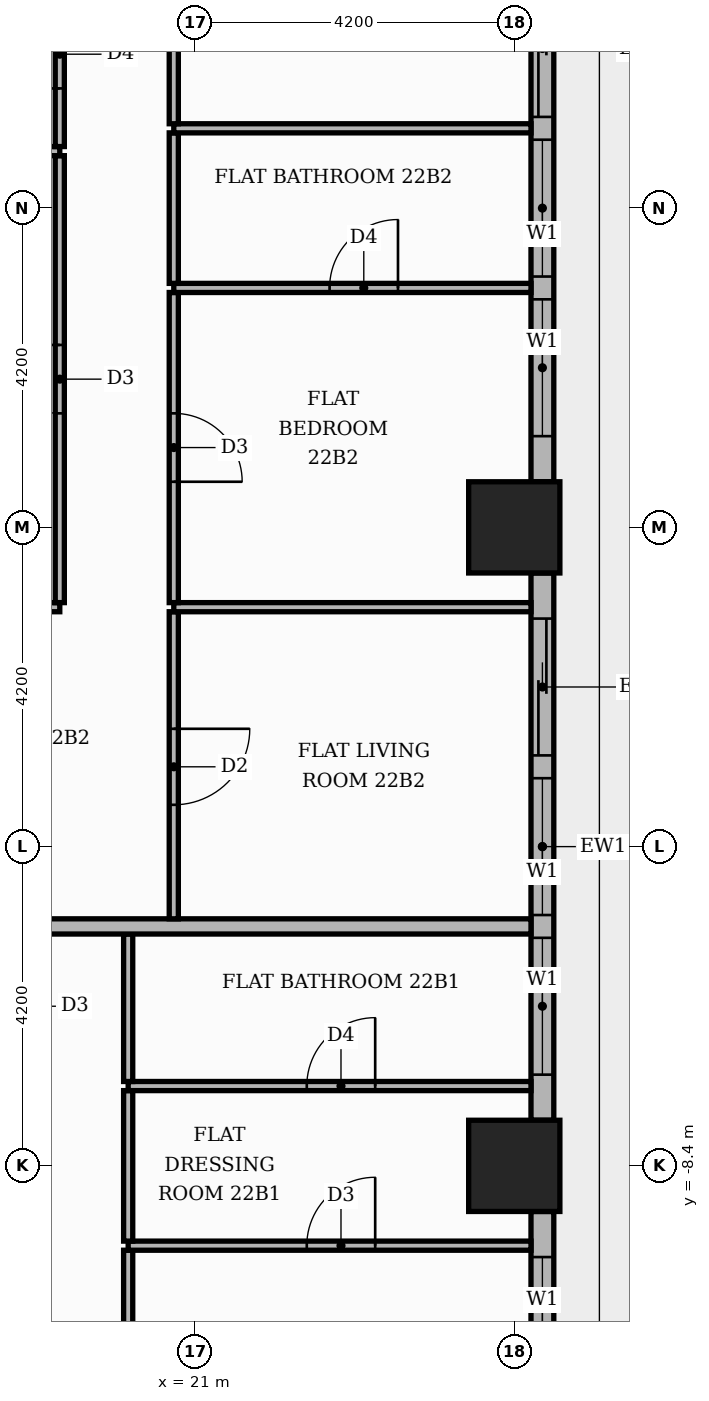
"""IFC4 building model, lengths in metres.
Left out: names, types, materials, properties, quantities, classifications, styles, units other than length and angle.
Written with IfcOpenShell. Run it as: python <this file> out.ifc"""

import sys

from ifc_helpers import new_model, si_unit, direction, frame, frame_2d, origin, origin_2d, place, context, subcontext, project, spatial, rectangle, extrude, element, fill, save


model = new_model("IFC4")
c1 = context("Model", 3, precision=1e-05, world=origin(), true_north=direction((0.0, 1.0)))
c2 = subcontext(c1, "Body", "Model", "MODEL_VIEW")
j1 = project(units=[si_unit("LENGTHUNIT", "METRE"), si_unit("PLANEANGLEUNIT", "RADIAN")], contexts=[c1])
p1 = place(None, origin())
s1 = spatial("IfcSite", under=j1, at=p1, CompositionType="ELEMENT")
p2 = place(p1, origin())
s2 = spatial("IfcBuilding", under=s1, at=p2, CompositionType="ELEMENT")
p3 = place(p2, frame((0.0, 0.0, 94.8)))
s3 = spatial("IfcBuildingStorey", under=s2, at=p3, CompositionType="ELEMENT", Elevation=94.8)
for number, where, z_axis, x_axis in (
    (1, (25.2, 0.0, 0.0), (0.0, 0.0, 1.0), (1.0, 0.0, 0.0)),
    (2, (25.2, -8.4, 0.0), (0.0, 0.0, 1.0), (1.0, 0.0, 0.0)),
):
    element("IfcColumn", number, at=place(p3, frame(where, z_axis=z_axis, x_axis=x_axis)), inside=s3, PredefinedType="COLUMN", context=c2, shape_type="SweptSolid", body=[
        extrude(rectangle(XDim=1.2, YDim=1.2, at=origin_2d()), origin(), (0.0, 0.0, 1.0), 3.9),
    ])
p4 = place(p3, frame((25.57, -16.2, 0.0), z_axis=(0.0, 0.0, 1.0), x_axis=(0.0, 1.0, 0.0)))
e3 = element("IfcWall", 3, at=p4, inside=s3, PredefinedType="STANDARD", context=c2, shape_type="SweptSolid", body=[
    extrude(rectangle(XDim=7.2, YDim=0.3, at=frame_2d((3.6, 0.0))), origin(), (0.0, 0.0, 1.0), 3.48),
])
p5 = place(p4, frame((0.6, 0.0, 0.0)))
e4 = element("IfcOpeningElement", 4, at=p5, cuts=e3, PredefinedType="OPENING", context=c2, shape_type="SweptSolid", body=[
    extrude(rectangle(XDim=1.8, YDim=2.4, at=frame_2d((0.9, 1.2))), frame((0.0, 0.16, 0.0), z_axis=(0.0, -1.0, 0.0), x_axis=(1.0, 0.0, 0.0)), (0.0, 0.0, 1.0), 0.32),
])
p6 = place(p4, frame((2.7, 0.0, 0.0)))
e5 = element("IfcOpeningElement", 5, at=p6, cuts=e3, PredefinedType="OPENING", context=c2, shape_type="SweptSolid", body=[
    extrude(rectangle(XDim=1.8, YDim=2.4, at=frame_2d((0.9, 1.2))), frame((0.0, 0.16, 0.0), z_axis=(0.0, -1.0, 0.0), x_axis=(1.0, 0.0, 0.0)), (0.0, 0.0, 1.0), 0.32),
])
p7 = place(p4, frame((4.8, 0.0, 0.9)))
e6 = element("IfcOpeningElement", 6, at=p7, cuts=e3, PredefinedType="OPENING", context=c2, shape_type="SweptSolid", body=[
    extrude(rectangle(XDim=1.8, YDim=2.1, at=frame_2d((0.9, 1.05))), frame((0.0, 0.16, 0.0), z_axis=(0.0, -1.0, 0.0), x_axis=(1.0, 0.0, 0.0)), (0.0, 0.0, 1.0), 0.32),
])
p8 = place(p3, frame((25.57, -7.8, 0.0), z_axis=(0.0, 0.0, 1.0), x_axis=(0.0, 1.0, 0.0)))
e7 = element("IfcWall", 7, at=p8, inside=s3, PredefinedType="STANDARD", context=c2, shape_type="SweptSolid", body=[
    extrude(rectangle(XDim=7.2, YDim=0.3, at=frame_2d((3.6, 0.0))), origin(), (0.0, 0.0, 1.0), 3.48),
])
p9 = place(p8, frame((0.6, 0.0, 0.9)))
e8 = element("IfcOpeningElement", 8, at=p9, cuts=e7, PredefinedType="OPENING", context=c2, shape_type="SweptSolid", body=[
    extrude(rectangle(XDim=1.8, YDim=2.1, at=frame_2d((0.9, 1.05))), frame((0.0, 0.16, 0.0), z_axis=(0.0, -1.0, 0.0), x_axis=(1.0, 0.0, 0.0)), (0.0, 0.0, 1.0), 0.32),
])
p10 = place(p8, frame((2.7, 0.0, 0.9)))
e9 = element("IfcOpeningElement", 9, at=p10, cuts=e7, PredefinedType="OPENING", context=c2, shape_type="SweptSolid", body=[
    extrude(rectangle(XDim=1.8, YDim=2.1, at=frame_2d((0.9, 1.05))), frame((0.0, 0.16, 0.0), z_axis=(0.0, -1.0, 0.0), x_axis=(1.0, 0.0, 0.0)), (0.0, 0.0, 1.0), 0.32),
])
p11 = place(p8, frame((4.8, 0.0, 0.0)))
e10 = element("IfcOpeningElement", 10, at=p11, cuts=e7, PredefinedType="OPENING", context=c2, shape_type="SweptSolid", body=[
    extrude(rectangle(XDim=1.8, YDim=2.4, at=frame_2d((0.9, 1.2))), frame((0.0, 0.16, 0.0), z_axis=(0.0, -1.0, 0.0), x_axis=(1.0, 0.0, 0.0)), (0.0, 0.0, 1.0), 0.32),
])
p12 = place(p3, frame((25.57, 0.6, 0.0), z_axis=(0.0, 0.0, 1.0), x_axis=(0.0, 1.0, 0.0)))
e11 = element("IfcWall", 11, at=p12, inside=s3, PredefinedType="STANDARD", context=c2, shape_type="SweptSolid", body=[
    extrude(rectangle(XDim=7.2, YDim=0.3, at=frame_2d((3.6, 0.0))), origin(), (0.0, 0.0, 1.0), 3.48),
])
p13 = place(p12, frame((0.6, 0.0, 0.9)))
e12 = element("IfcOpeningElement", 12, at=p13, cuts=e11, PredefinedType="OPENING", context=c2, shape_type="SweptSolid", body=[
    extrude(rectangle(XDim=1.8, YDim=2.1, at=frame_2d((0.9, 1.05))), frame((0.0, 0.16, 0.0), z_axis=(0.0, -1.0, 0.0), x_axis=(1.0, 0.0, 0.0)), (0.0, 0.0, 1.0), 0.32),
])
p14 = place(p12, frame((2.7, 0.0, 0.9)))
e13 = element("IfcOpeningElement", 13, at=p14, cuts=e11, PredefinedType="OPENING", context=c2, shape_type="SweptSolid", body=[
    extrude(rectangle(XDim=1.8, YDim=2.1, at=frame_2d((0.9, 1.05))), frame((0.0, 0.16, 0.0), z_axis=(0.0, -1.0, 0.0), x_axis=(1.0, 0.0, 0.0)), (0.0, 0.0, 1.0), 0.32),
])
p15 = place(p12, frame((4.8, 0.0, 0.0)))
e14 = element("IfcOpeningElement", 14, at=p15, cuts=e11, PredefinedType="OPENING", context=c2, shape_type="SweptSolid", body=[
    extrude(rectangle(XDim=1.8, YDim=2.4, at=frame_2d((0.9, 1.2))), frame((0.0, 0.16, 0.0), z_axis=(0.0, -1.0, 0.0), x_axis=(1.0, 0.0, 0.0)), (0.0, 0.0, 1.0), 0.32),
])
p16 = place(p3, frame((20.12, -13.59, 0.0), z_axis=(0.0, 0.0, 1.0), x_axis=(0.0, 1.0, 0.0)))
e15 = element("IfcWall", 15, at=p16, inside=s3, PredefinedType="PARTITIONING", context=c2, shape_type="SweptSolid", body=[
    extrude(rectangle(XDim=4.08, YDim=0.12, at=frame_2d((2.04, 0.0))), origin(), (0.0, 0.0, 1.0), 3.48),
])
p17 = place(p16, frame((1.59, 0.0, 0.0)))
e16 = element("IfcOpeningElement", 16, at=p17, cuts=e15, PredefinedType="OPENING", context=c2, shape_type="SweptSolid", body=[
    extrude(rectangle(XDim=0.9, YDim=2.1, at=frame_2d((0.45, 1.05))), frame((0.0, 0.07, 0.0), z_axis=(0.0, -1.0, 0.0), x_axis=(1.0, 0.0, 0.0)), (0.0, 0.0, 1.0), 0.14),
])
p18 = place(p3, frame((20.12, -9.45, 0.0), z_axis=(0.0, 0.0, 1.0), x_axis=(1.0, 0.0, 0.0)))
e17 = element("IfcWall", 17, at=p18, inside=s3, PredefinedType="PARTITIONING", context=c2, shape_type="SweptSolid", body=[
    extrude(rectangle(XDim=5.3, YDim=0.12, at=frame_2d((2.65, 0.0))), origin(), (0.0, 0.0, 1.0), 3.48),
])
p19 = place(p18, frame((2.35, 0.0, 0.0)))
e18 = element("IfcOpeningElement", 18, at=p19, cuts=e17, PredefinedType="OPENING", context=c2, shape_type="SweptSolid", body=[
    extrude(rectangle(XDim=0.9, YDim=2.1, at=frame_2d((0.45, 1.05))), frame((0.0, 0.07, 0.0), z_axis=(0.0, -1.0, 0.0), x_axis=(1.0, 0.0, 0.0)), (0.0, 0.0, 1.0), 0.14),
])
p20 = place(p3, frame((20.12, -9.39, 0.0), z_axis=(0.0, 0.0, 1.0), x_axis=(0.0, 1.0, 0.0)))
e19 = element("IfcWall", 19, at=p20, inside=s3, PredefinedType="PARTITIONING", context=c2, shape_type="SweptSolid", body=[
    extrude(rectangle(XDim=1.98, YDim=0.12, at=frame_2d((0.99, 0.0))), origin(), (0.0, 0.0, 1.0), 3.48),
])
p21 = place(p3, frame((20.12, -7.35, 0.0), z_axis=(0.0, 0.0, 1.0), x_axis=(1.0, 0.0, 0.0)))
e20 = element("IfcWall", 20, at=p21, inside=s3, PredefinedType="PARTITIONING", context=c2, shape_type="SweptSolid", body=[
    extrude(rectangle(XDim=5.3, YDim=0.12, at=frame_2d((2.65, 0.0))), origin(), (0.0, 0.0, 1.0), 3.48),
])
p22 = place(p21, frame((2.35, 0.0, 0.0)))
e21 = element("IfcOpeningElement", 21, at=p22, cuts=e20, PredefinedType="OPENING", context=c2, shape_type="SweptSolid", body=[
    extrude(rectangle(XDim=0.9, YDim=2.1, at=frame_2d((0.45, 1.05))), frame((0.0, 0.07, 0.0), z_axis=(0.0, -1.0, 0.0), x_axis=(1.0, 0.0, 0.0)), (0.0, 0.0, 1.0), 0.14),
])
p23 = place(p3, frame((20.12, -7.29, 0.0), z_axis=(0.0, 0.0, 1.0), x_axis=(0.0, 1.0, 0.0)))
e22 = element("IfcWall", 22, at=p23, inside=s3, PredefinedType="PARTITIONING", context=c2, shape_type="SweptSolid", body=[
    extrude(rectangle(XDim=1.94, YDim=0.12, at=frame_2d((0.97, 0.0))), origin(), (0.0, 0.0, 1.0), 3.48),
])
p24 = place(p3, frame((13.65, -5.25, 0.0), z_axis=(0.0, 0.0, 1.0), x_axis=(1.0, 0.0, 0.0)))
e23 = element("IfcWall", 23, at=p24, inside=s3, PredefinedType="PARTITIONING", context=c2, shape_type="SweptSolid", body=[
    extrude(rectangle(XDim=11.77, YDim=0.2, at=frame_2d((5.885, 0.0))), origin(), (0.0, 0.0, 1.0), 3.48),
])
p25 = place(p3, frame((20.72, -5.15, 0.0), z_axis=(0.0, 0.0, 1.0), x_axis=(0.0, 1.0, 0.0)))
e24 = element("IfcWall", 24, at=p25, inside=s3, PredefinedType="PARTITIONING", context=c2, shape_type="SweptSolid", body=[
    extrude(rectangle(XDim=4.04, YDim=0.12, at=frame_2d((2.02, 0.0))), origin(), (0.0, 0.0, 1.0), 3.48),
])
p26 = place(p25, frame((1.5, 0.0, 0.0)))
e25 = element("IfcOpeningElement", 25, at=p26, cuts=e24, PredefinedType="OPENING", context=c2, shape_type="SweptSolid", body=[
    extrude(rectangle(XDim=1.0, YDim=2.1, at=frame_2d((0.5, 1.05))), frame((0.0, 0.07, 0.0), z_axis=(0.0, -1.0, 0.0), x_axis=(1.0, 0.0, 0.0)), (0.0, 0.0, 1.0), 0.14),
])
p27 = place(p3, frame((13.75, -1.05, 0.0), z_axis=(0.0, 0.0, 1.0), x_axis=(1.0, 0.0, 0.0)))
e26 = element("IfcWall", 26, at=p27, inside=s3, PredefinedType="PARTITIONING", context=c2, shape_type="SweptSolid", body=[
    extrude(rectangle(XDim=5.47, YDim=0.12, at=frame_2d((2.735, 0.0))), origin(), (0.0, 0.0, 1.0), 3.48),
])
p28 = place(p3, frame((20.72, -1.05, 0.0), z_axis=(0.0, 0.0, 1.0), x_axis=(1.0, 0.0, 0.0)))
e27 = element("IfcWall", 27, at=p28, inside=s3, PredefinedType="PARTITIONING", context=c2, shape_type="SweptSolid", body=[
    extrude(rectangle(XDim=4.7, YDim=0.12, at=frame_2d((2.35, 0.0))), origin(), (0.0, 0.0, 1.0), 3.48),
])
p29 = place(p3, frame((19.22, -0.99, 0.0), z_axis=(0.0, 0.0, 1.0), x_axis=(0.0, 1.0, 0.0)))
e28 = element("IfcWall", 28, at=p29, inside=s3, PredefinedType="PARTITIONING", context=c2, shape_type="SweptSolid", body=[
    extrude(rectangle(XDim=5.88, YDim=0.12, at=frame_2d((2.94, 0.0))), origin(), (0.0, 0.0, 1.0), 3.48),
])
p30 = place(p29, frame((2.49, 0.0, 0.0)))
e29 = element("IfcOpeningElement", 29, at=p30, cuts=e28, PredefinedType="OPENING", context=c2, shape_type="SweptSolid", body=[
    extrude(rectangle(XDim=0.9, YDim=2.1, at=frame_2d((0.45, 1.05))), frame((0.0, 0.07, 0.0), z_axis=(0.0, -1.0, 0.0), x_axis=(1.0, 0.0, 0.0)), (0.0, 0.0, 1.0), 0.14),
])
p31 = place(p3, frame((20.72, -0.99, 0.0), z_axis=(0.0, 0.0, 1.0), x_axis=(0.0, 1.0, 0.0)))
e30 = element("IfcWall", 30, at=p31, inside=s3, PredefinedType="PARTITIONING", context=c2, shape_type="SweptSolid", body=[
    extrude(rectangle(XDim=4.08, YDim=0.12, at=frame_2d((2.04, 0.0))), origin(), (0.0, 0.0, 1.0), 3.48),
])
p32 = place(p31, frame((1.59, 0.0, 0.0)))
e31 = element("IfcOpeningElement", 31, at=p32, cuts=e30, PredefinedType="OPENING", context=c2, shape_type="SweptSolid", body=[
    extrude(rectangle(XDim=0.9, YDim=2.1, at=frame_2d((0.45, 1.05))), frame((0.0, 0.07, 0.0), z_axis=(0.0, -1.0, 0.0), x_axis=(1.0, 0.0, 0.0)), (0.0, 0.0, 1.0), 0.14),
])
p33 = place(p3, frame((20.72, 3.15, 0.0), z_axis=(0.0, 0.0, 1.0), x_axis=(1.0, 0.0, 0.0)))
e32 = element("IfcWall", 32, at=p33, inside=s3, PredefinedType="PARTITIONING", context=c2, shape_type="SweptSolid", body=[
    extrude(rectangle(XDim=4.7, YDim=0.12, at=frame_2d((2.35, 0.0))), origin(), (0.0, 0.0, 1.0), 3.48),
])
p34 = place(p33, frame((2.05, 0.0, 0.0)))
e33 = element("IfcOpeningElement", 33, at=p34, cuts=e32, PredefinedType="OPENING", context=c2, shape_type="SweptSolid", body=[
    extrude(rectangle(XDim=0.9, YDim=2.1, at=frame_2d((0.45, 1.05))), frame((0.0, 0.07, 0.0), z_axis=(0.0, -1.0, 0.0), x_axis=(1.0, 0.0, 0.0)), (0.0, 0.0, 1.0), 0.14),
])
p35 = place(p3, frame((20.72, 3.21, 0.0), z_axis=(0.0, 0.0, 1.0), x_axis=(0.0, 1.0, 0.0)))
e34 = element("IfcWall", 34, at=p35, inside=s3, PredefinedType="PARTITIONING", context=c2, shape_type="SweptSolid", body=[
    extrude(rectangle(XDim=1.98, YDim=0.12, at=frame_2d((0.99, 0.0))), origin(), (0.0, 0.0, 1.0), 3.48),
])
p36 = place(p3, frame((13.75, 4.95, 0.0), z_axis=(0.0, 0.0, 1.0), x_axis=(1.0, 0.0, 0.0)))
e35 = element("IfcWall", 35, at=p36, inside=s3, PredefinedType="PARTITIONING", context=c2, shape_type="SweptSolid", body=[
    extrude(rectangle(XDim=5.47, YDim=0.12, at=frame_2d((2.735, 0.0))), origin(), (0.0, 0.0, 1.0), 3.48),
])
p37 = place(p3, frame((19.22, 5.01, 0.0), z_axis=(0.0, 0.0, 1.0), x_axis=(0.0, 1.0, 0.0)))
e36 = element("IfcWall", 36, at=p37, inside=s3, PredefinedType="PARTITIONING", context=c2, shape_type="SweptSolid", body=[
    extrude(rectangle(XDim=2.43, YDim=0.12, at=frame_2d((1.215, 0.0))), origin(), (0.0, 0.0, 1.0), 3.48),
])
p38 = place(p37, frame((0.765, 0.0, 0.0)))
e37 = element("IfcOpeningElement", 37, at=p38, cuts=e36, PredefinedType="OPENING", context=c2, shape_type="SweptSolid", body=[
    extrude(rectangle(XDim=0.9, YDim=2.1, at=frame_2d((0.45, 1.05))), frame((0.0, 0.07, 0.0), z_axis=(0.0, -1.0, 0.0), x_axis=(1.0, 0.0, 0.0)), (0.0, 0.0, 1.0), 0.14),
])
p39 = place(p3, frame((20.72, 5.25, 0.0), z_axis=(0.0, 0.0, 1.0), x_axis=(1.0, 0.0, 0.0)))
e38 = element("IfcWall", 38, at=p39, inside=s3, PredefinedType="PARTITIONING", context=c2, shape_type="SweptSolid", body=[
    extrude(rectangle(XDim=4.7, YDim=0.12, at=frame_2d((2.35, 0.0))), origin(), (0.0, 0.0, 1.0), 3.48),
])
p40 = place(p3, frame((20.72, 5.31, 0.0), z_axis=(0.0, 0.0, 1.0), x_axis=(0.0, 1.0, 0.0)))
e39 = element("IfcWall", 39, at=p40, inside=s3, PredefinedType="PARTITIONING", context=c2, shape_type="SweptSolid", body=[
    extrude(rectangle(XDim=4.08, YDim=0.12, at=frame_2d((2.04, 0.0))), origin(), (0.0, 0.0, 1.0), 3.48),
])
p41 = place(p40, frame((1.59, 0.0, 0.0)))
e40 = element("IfcOpeningElement", 40, at=p41, cuts=e39, PredefinedType="OPENING", context=c2, shape_type="SweptSolid", body=[
    extrude(rectangle(XDim=0.9, YDim=2.1, at=frame_2d((0.45, 1.05))), frame((0.0, 0.07, 0.0), z_axis=(0.0, -1.0, 0.0), x_axis=(1.0, 0.0, 0.0)), (0.0, 0.0, 1.0), 0.14),
])
p42 = place(p7, origin())
e41 = element("IfcWindow", 41, at=p42, inside=s3, PartitioningType="SINGLE_PANEL", PredefinedType="WINDOW", context=c2, shape_type="SweptSolid", body=[
    extrude(rectangle(XDim=1.8, YDim=2.1, at=frame_2d((0.9, 1.05))), frame((0.0, 0.03, 0.0), z_axis=(0.0, -1.0, 0.0), x_axis=(1.0, 0.0, 0.0)), (0.0, 0.0, 1.0), 0.06),
])
fill(e6, e41)
p43 = place(p9, origin())
e42 = element("IfcWindow", 42, at=p43, inside=s3, PartitioningType="SINGLE_PANEL", PredefinedType="WINDOW", context=c2, shape_type="SweptSolid", body=[
    extrude(rectangle(XDim=1.8, YDim=2.1, at=frame_2d((0.9, 1.05))), frame((0.0, 0.03, 0.0), z_axis=(0.0, -1.0, 0.0), x_axis=(1.0, 0.0, 0.0)), (0.0, 0.0, 1.0), 0.06),
])
fill(e8, e42)
p44 = place(p10, origin())
e43 = element("IfcWindow", 43, at=p44, inside=s3, PartitioningType="SINGLE_PANEL", PredefinedType="WINDOW", context=c2, shape_type="SweptSolid", body=[
    extrude(rectangle(XDim=1.8, YDim=2.1, at=frame_2d((0.9, 1.05))), frame((0.0, 0.03, 0.0), z_axis=(0.0, -1.0, 0.0), x_axis=(1.0, 0.0, 0.0)), (0.0, 0.0, 1.0), 0.06),
])
fill(e9, e43)
p45 = place(p11, origin())
e44 = element("IfcDoor", 44, at=p45, inside=s3, OperationType="SLIDING_TO_RIGHT", PredefinedType="DOOR", context=c2, shape_type="SweptSolid", body=[
    extrude(rectangle(XDim=1.8, YDim=2.4, at=frame_2d((0.9, 1.2))), frame((0.0, 0.025, 0.0), z_axis=(0.0, -1.0, 0.0), x_axis=(1.0, 0.0, 0.0)), (0.0, 0.0, 1.0), 0.05),
])
fill(e10, e44)
p46 = place(p13, origin())
e45 = element("IfcWindow", 45, at=p46, inside=s3, PartitioningType="SINGLE_PANEL", PredefinedType="WINDOW", context=c2, shape_type="SweptSolid", body=[
    extrude(rectangle(XDim=1.8, YDim=2.1, at=frame_2d((0.9, 1.05))), frame((0.0, 0.03, 0.0), z_axis=(0.0, -1.0, 0.0), x_axis=(1.0, 0.0, 0.0)), (0.0, 0.0, 1.0), 0.06),
])
fill(e12, e45)
p47 = place(p14, origin())
e46 = element("IfcWindow", 46, at=p47, inside=s3, PartitioningType="SINGLE_PANEL", PredefinedType="WINDOW", context=c2, shape_type="SweptSolid", body=[
    extrude(rectangle(XDim=1.8, YDim=2.1, at=frame_2d((0.9, 1.05))), frame((0.0, 0.03, 0.0), z_axis=(0.0, -1.0, 0.0), x_axis=(1.0, 0.0, 0.0)), (0.0, 0.0, 1.0), 0.06),
])
fill(e13, e46)
p48 = place(p15, origin())
e47 = element("IfcDoor", 47, at=p48, inside=s3, OperationType="SLIDING_TO_RIGHT", PredefinedType="DOOR", context=c2, shape_type="SweptSolid", body=[
    extrude(rectangle(XDim=1.8, YDim=2.4, at=frame_2d((0.9, 1.2))), frame((0.0, 0.025, 0.0), z_axis=(0.0, -1.0, 0.0), x_axis=(1.0, 0.0, 0.0)), (0.0, 0.0, 1.0), 0.05),
])
fill(e14, e47)
p49 = place(p19, origin())
e48 = element("IfcDoor", 48, at=p49, inside=s3, OperationType="SINGLE_SWING_RIGHT", PredefinedType="DOOR", context=c2, shape_type="SweptSolid", body=[
    extrude(rectangle(XDim=0.9, YDim=2.1, at=frame_2d((0.45, 1.05))), frame((0.0, 0.025, 0.0), z_axis=(0.0, -1.0, 0.0), x_axis=(1.0, 0.0, 0.0)), (0.0, 0.0, 1.0), 0.05),
])
fill(e18, e48)
p50 = place(p22, origin())
e49 = element("IfcDoor", 49, at=p50, inside=s3, OperationType="SINGLE_SWING_RIGHT", PredefinedType="DOOR", context=c2, shape_type="SweptSolid", body=[
    extrude(rectangle(XDim=0.9, YDim=2.1, at=frame_2d((0.45, 1.05))), frame((0.0, 0.025, 0.0), z_axis=(0.0, -1.0, 0.0), x_axis=(1.0, 0.0, 0.0)), (0.0, 0.0, 1.0), 0.05),
])
fill(e21, e49)
p51 = place(p30, origin())
e50 = element("IfcDoor", 50, at=p51, inside=s3, OperationType="SINGLE_SWING_RIGHT", PredefinedType="DOOR", context=c2, shape_type="SweptSolid", body=[
    extrude(rectangle(XDim=0.9, YDim=2.1, at=frame_2d((0.45, 1.05))), frame((0.0, 0.025, 0.0), z_axis=(0.0, -1.0, 0.0), x_axis=(1.0, 0.0, 0.0)), (0.0, 0.0, 1.0), 0.05),
])
fill(e29, e50)
p52 = place(p38, origin())
e51 = element("IfcDoor", 51, at=p52, inside=s3, OperationType="SINGLE_SWING_LEFT", PredefinedType="DOOR", context=c2, shape_type="SweptSolid", body=[
    extrude(rectangle(XDim=0.9, YDim=2.1, at=frame_2d((0.45, 1.05))), frame((0.0, 0.025, 0.0), z_axis=(0.0, -1.0, 0.0), x_axis=(1.0, 0.0, 0.0)), (0.0, 0.0, 1.0), 0.05),
])
fill(e37, e51)
p53 = place(p26, frame((1.0, 0.0, 0.0), z_axis=(0.0, 0.0, 1.0), x_axis=(-1.0, 0.0, 0.0)))
e52 = element("IfcDoor", 52, at=p53, inside=s3, OperationType="SINGLE_SWING_RIGHT", PredefinedType="DOOR", context=c2, shape_type="SweptSolid", body=[
    extrude(rectangle(XDim=1.0, YDim=2.1, at=frame_2d((0.5, 1.05))), frame((0.0, 0.025, 0.0), z_axis=(0.0, -1.0, 0.0), x_axis=(1.0, 0.0, 0.0)), (0.0, 0.0, 1.0), 0.05),
])
fill(e25, e52)
p54 = place(p32, frame((0.9, 0.0, 0.0), z_axis=(0.0, 0.0, 1.0), x_axis=(-1.0, 0.0, 0.0)))
e53 = element("IfcDoor", 53, at=p54, inside=s3, OperationType="SINGLE_SWING_LEFT", PredefinedType="DOOR", context=c2, shape_type="SweptSolid", body=[
    extrude(rectangle(XDim=0.9, YDim=2.1, at=frame_2d((0.45, 1.05))), frame((0.0, 0.025, 0.0), z_axis=(0.0, -1.0, 0.0), x_axis=(1.0, 0.0, 0.0)), (0.0, 0.0, 1.0), 0.05),
])
fill(e31, e53)
p55 = place(p34, origin())
e54 = element("IfcDoor", 54, at=p55, inside=s3, OperationType="SINGLE_SWING_RIGHT", PredefinedType="DOOR", context=c2, shape_type="SweptSolid", body=[
    extrude(rectangle(XDim=0.9, YDim=2.1, at=frame_2d((0.45, 1.05))), frame((0.0, 0.025, 0.0), z_axis=(0.0, -1.0, 0.0), x_axis=(1.0, 0.0, 0.0)), (0.0, 0.0, 1.0), 0.05),
])
fill(e33, e54)
save(model, sys.argv[1])
